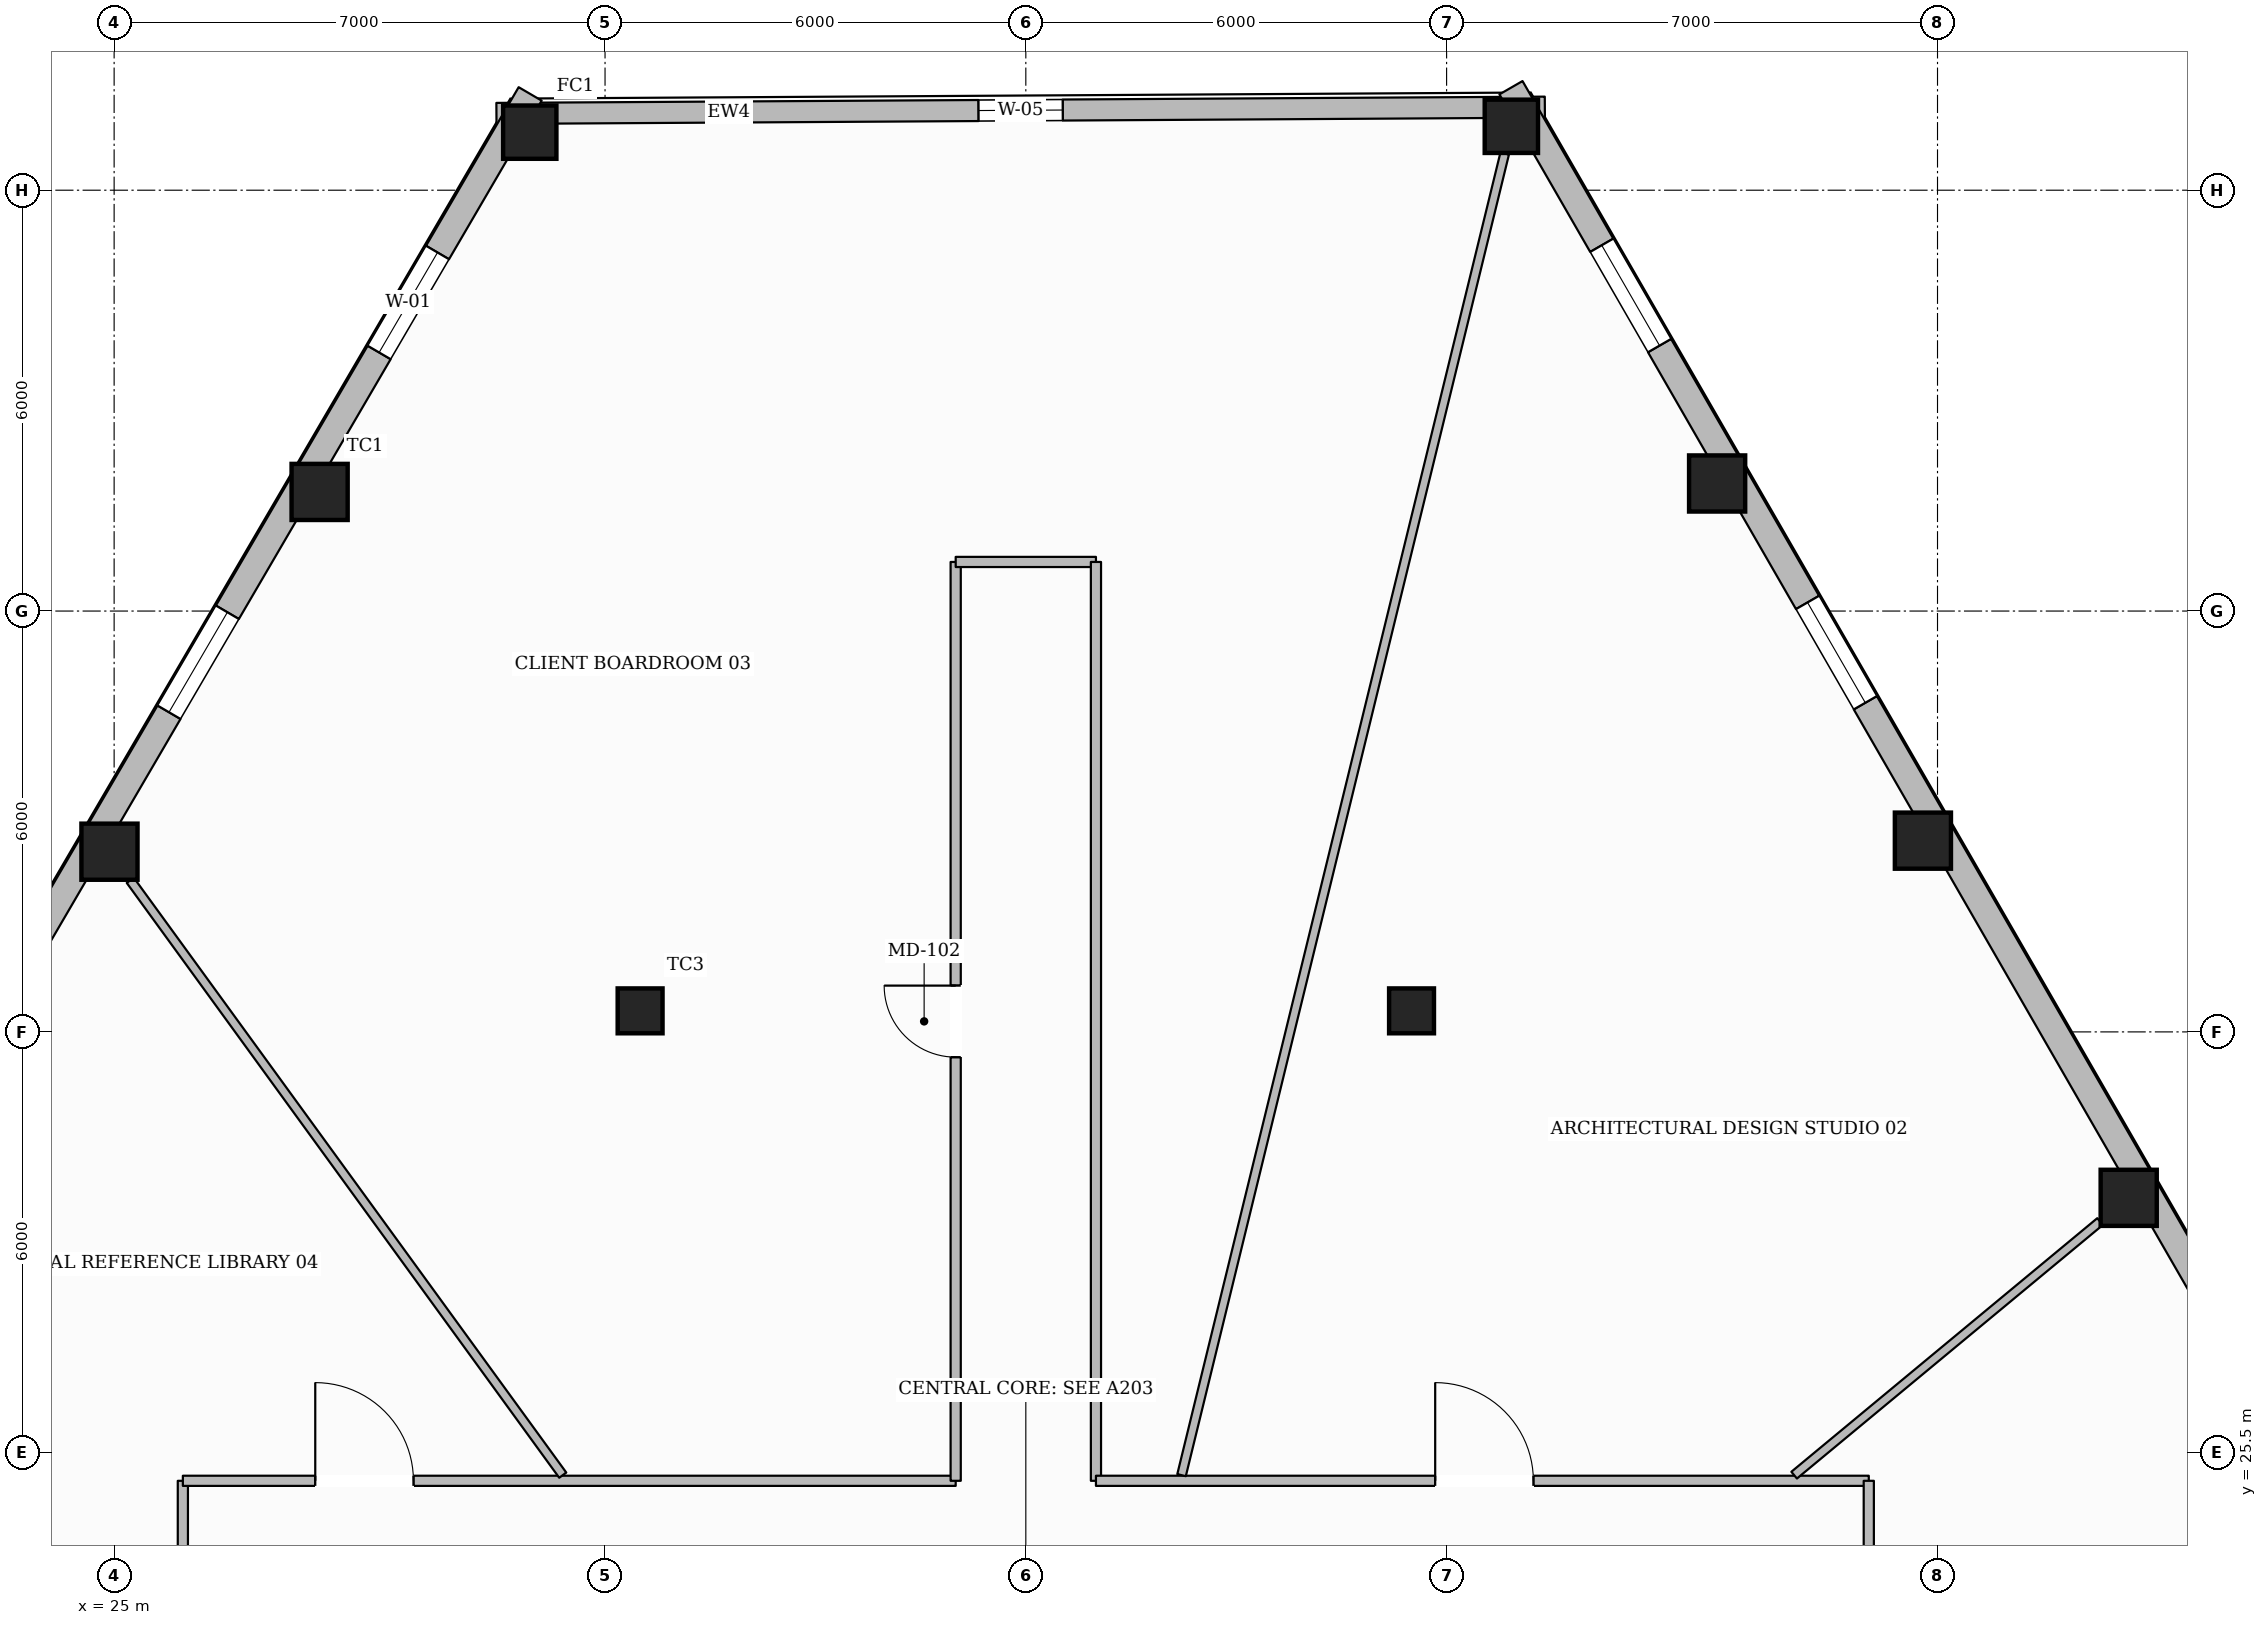
"""IFC4 building model, lengths in metres.
Left out: names, types, materials, properties, quantities, classifications, styles, units other than length and angle.
Written with IfcOpenShell. Run it as: python <this file> out.ifc"""

import sys

from ifc_helpers import new_model, si_unit, direction, frame, frame_2d, origin, origin_2d, place, context, subcontext, project, spatial, rectangle, hollow_rectangle, extrude, element, fill, save


model = new_model("IFC4")
c1 = context("Model", 3, precision=1e-05, world=origin(), true_north=direction((0.0, 1.0)))
c2 = subcontext(c1, "Body", "Model", "MODEL_VIEW")
j1 = project(units=[si_unit("LENGTHUNIT", "METRE"), si_unit("PLANEANGLEUNIT", "RADIAN")], contexts=[c1])
p1 = place(None, origin())
s1 = spatial("IfcSite", under=j1, at=p1, CompositionType="ELEMENT")
p2 = place(p1, origin())
s2 = spatial("IfcBuilding", under=s1, at=p2, CompositionType="ELEMENT")
p3 = place(p2, frame((0.0, 0.0, 71.45)))
s3 = spatial("IfcBuildingStorey", under=s2, at=p3, CompositionType="ELEMENT", Elevation=71.45)
p4 = place(p3, frame((30.927, 44.328, 0.0), z_axis=(0.0, 0.0, 1.0), x_axis=(1.0, 0.0, 0.0)))
e1 = element("IfcColumn", 1, at=p4, inside=s3, PredefinedType="COLUMN", context=c2, shape_type="SweptSolid", body=[
    extrude(hollow_rectangle(XDim=0.76, YDim=0.76, WallThickness=0.035, at=origin_2d()), origin(), (0.0, 0.0, 1.0), 3.43),
])
for number, where, z_axis, x_axis in (
    (2, (27.93, 39.198, 0.0), (0.0, 0.0, 1.0), (1.0, 0.0, 0.0)),
    (3, (24.934, 34.069, 0.0), (0.0, 0.0, 1.0), (1.0, 0.0, 0.0)),
    (4, (53.726, 29.134, 0.0), (0.0, 0.0, 1.0), (1.0, 0.0, 0.0)),
    (5, (50.792, 34.227, 0.0), (0.0, 0.0, 1.0), (1.0, 0.0, 0.0)),
    (6, (47.857, 39.319, 0.0), (0.0, 0.0, 1.0), (1.0, 0.0, 0.0)),
):
    element("IfcColumn", number, at=place(p3, frame(where, z_axis=z_axis, x_axis=x_axis)), inside=s3, PredefinedType="COLUMN", context=c2, shape_type="SweptSolid", body=[
        extrude(hollow_rectangle(XDim=0.8, YDim=0.8, WallThickness=0.036, at=origin_2d()), origin(), (0.0, 0.0, 1.0), 3.43),
    ])
p5 = place(p3, frame((44.923, 44.411, 0.0), z_axis=(0.0, 0.0, 1.0), x_axis=(1.0, 0.0, 0.0)))
e7 = element("IfcColumn", 7, at=p5, inside=s3, PredefinedType="COLUMN", context=c2, shape_type="SweptSolid", body=[
    extrude(hollow_rectangle(XDim=0.76, YDim=0.76, WallThickness=0.035, at=origin_2d()), origin(), (0.0, 0.0, 1.0), 3.43),
])
for number, where, z_axis, x_axis in (
    (8, (32.5, 31.8, 0.0), (0.0, 0.0, 1.0), (1.0, 0.0, 0.0)),
    (9, (43.5, 31.8, 0.0), (0.0, 0.0, 1.0), (1.0, 0.0, 0.0)),
):
    element("IfcColumn", number, at=place(p3, frame(where, z_axis=z_axis, x_axis=x_axis)), inside=s3, PredefinedType="COLUMN", context=c2, shape_type="SweptSolid", body=[
        extrude(hollow_rectangle(XDim=0.64, YDim=0.64, WallThickness=0.028, at=origin_2d()), origin(), (0.0, 0.0, 1.0), 3.43),
    ])
p6 = place(p3, frame((30.451, 44.595, 0.0), z_axis=(0.0, 0.0, 1.0), x_axis=(0.999982137203, 0.005977062405, 0.0)))
e10 = element("IfcWall", 10, at=p6, inside=s3, PredefinedType="STANDARD", context=c2, shape_type="SweptSolid", body=[
    extrude(rectangle(XDim=14.95, YDim=0.3, at=frame_2d((7.475, 0.0))), origin(), (0.0, 0.0, 1.0), 2.81),
])
p7 = place(p6, frame((6.875, 0.0, 0.65)))
e11 = element("IfcOpeningElement", 11, at=p7, cuts=e10, PredefinedType="OPENING", context=c2, shape_type="SweptSolid", body=[
    extrude(rectangle(XDim=1.2, YDim=1.55, at=frame_2d((0.6, 0.775))), frame((0.0, 0.16, 0.0), z_axis=(0.0, -1.0, 0.0), x_axis=(1.0, 0.0, 0.0)), (0.0, 0.0, 1.0), 0.32),
])
p8 = place(p3, frame((12.473, 13.275, 0.0), z_axis=(0.0, 0.0, 1.0), x_axis=(0.504426765764, 0.863454479391, 0.0)))
e12 = element("IfcWall", 12, at=p8, inside=s3, PredefinedType="STANDARD", context=c2, shape_type="SweptSolid", body=[
    extrude(rectangle(XDim=36.594, YDim=0.38, at=frame_2d((18.297, 0.0))), origin(), (0.0, 0.0, 1.0), 2.81),
])
p9 = place(p8, frame((8.749, 0.0, 0.0)))
e13 = element("IfcOpeningElement", 13, at=p9, cuts=e12, PredefinedType="OPENING", context=c2, shape_type="SweptSolid", body=[
    extrude(rectangle(XDim=1.0, YDim=2.2, at=frame_2d((0.5, 1.1))), frame((0.0, 0.2, 0.0), z_axis=(0.0, -1.0, 0.0), x_axis=(1.0, 0.0, 0.0)), (0.0, 0.0, 1.0), 0.4),
])
p10 = place(p8, frame((32.326, 0.0, 0.55)))
e14 = element("IfcOpeningElement", 14, at=p10, cuts=e12, PredefinedType="OPENING", context=c2, shape_type="SweptSolid", body=[
    extrude(rectangle(XDim=1.65, YDim=1.6, at=frame_2d((0.825, 0.8))), frame((0.0, 0.2, 0.0), z_axis=(0.0, -1.0, 0.0), x_axis=(1.0, 0.0, 0.0)), (0.0, 0.0, 1.0), 0.4),
])
p11 = place(p8, frame((26.385, 0.0, 0.55)))
e15 = element("IfcOpeningElement", 15, at=p11, cuts=e12, PredefinedType="OPENING", context=c2, shape_type="SweptSolid", body=[
    extrude(rectangle(XDim=1.65, YDim=1.6, at=frame_2d((0.825, 0.8))), frame((0.0, 0.2, 0.0), z_axis=(0.0, -1.0, 0.0), x_axis=(1.0, 0.0, 0.0)), (0.0, 0.0, 1.0), 0.4),
])
p12 = place(p8, frame((20.445, 0.0, 0.55)))
e16 = element("IfcOpeningElement", 16, at=p12, cuts=e12, PredefinedType="OPENING", context=c2, shape_type="SweptSolid", body=[
    extrude(rectangle(XDim=1.65, YDim=1.6, at=frame_2d((0.825, 0.8))), frame((0.0, 0.2, 0.0), z_axis=(0.0, -1.0, 0.0), x_axis=(1.0, 0.0, 0.0)), (0.0, 0.0, 1.0), 0.4),
])
p13 = place(p8, frame((2.624, 0.0, 0.55)))
e17 = element("IfcOpeningElement", 17, at=p13, cuts=e12, PredefinedType="OPENING", context=c2, shape_type="SweptSolid", body=[
    extrude(rectangle(XDim=1.65, YDim=1.6, at=frame_2d((0.825, 0.8))), frame((0.0, 0.2, 0.0), z_axis=(0.0, -1.0, 0.0), x_axis=(1.0, 0.0, 0.0)), (0.0, 0.0, 1.0), 0.4),
])
p14 = place(p3, frame((44.918, 44.961, 0.0), z_axis=(0.0, 0.0, 1.0), x_axis=(0.499266462474, -0.866448497863, 0.0)))
e18 = element("IfcWall", 18, at=p14, inside=s3, PredefinedType="STANDARD", context=c2, shape_type="SweptSolid", body=[
    extrude(rectangle(XDim=36.221, YDim=0.38, at=frame_2d((18.11, 0.0))), origin(), (0.0, 0.0, 1.0), 2.81),
])
p15 = place(p14, frame((31.979, 0.0, 0.55)))
e19 = element("IfcOpeningElement", 19, at=p15, cuts=e18, PredefinedType="OPENING", context=c2, shape_type="SweptSolid", body=[
    extrude(rectangle(XDim=1.65, YDim=1.6, at=frame_2d((0.825, 0.8))), frame((0.0, 0.2, 0.0), z_axis=(0.0, -1.0, 0.0), x_axis=(1.0, 0.0, 0.0)), (0.0, 0.0, 1.0), 0.4),
])
p16 = place(p14, frame((26.102, 0.0, 0.55)))
e20 = element("IfcOpeningElement", 20, at=p16, cuts=e18, PredefinedType="OPENING", context=c2, shape_type="SweptSolid", body=[
    extrude(rectangle(XDim=1.65, YDim=1.6, at=frame_2d((0.825, 0.8))), frame((0.0, 0.2, 0.0), z_axis=(0.0, -1.0, 0.0), x_axis=(1.0, 0.0, 0.0)), (0.0, 0.0, 1.0), 0.4),
])
p17 = place(p14, frame((20.224, 0.0, 0.55)))
e21 = element("IfcOpeningElement", 21, at=p17, cuts=e18, PredefinedType="OPENING", context=c2, shape_type="SweptSolid", body=[
    extrude(rectangle(XDim=1.65, YDim=1.6, at=frame_2d((0.825, 0.8))), frame((0.0, 0.2, 0.0), z_axis=(0.0, -1.0, 0.0), x_axis=(1.0, 0.0, 0.0)), (0.0, 0.0, 1.0), 0.4),
])
p18 = place(p14, frame((8.47, 0.0, 0.55)))
e22 = element("IfcOpeningElement", 22, at=p18, cuts=e18, PredefinedType="OPENING", context=c2, shape_type="SweptSolid", body=[
    extrude(rectangle(XDim=1.65, YDim=1.6, at=frame_2d((0.825, 0.8))), frame((0.0, 0.2, 0.0), z_axis=(0.0, -1.0, 0.0), x_axis=(1.0, 0.0, 0.0)), (0.0, 0.0, 1.0), 0.4),
])
p19 = place(p14, frame((2.593, 0.0, 0.55)))
e23 = element("IfcOpeningElement", 23, at=p19, cuts=e18, PredefinedType="OPENING", context=c2, shape_type="SweptSolid", body=[
    extrude(rectangle(XDim=1.65, YDim=1.6, at=frame_2d((0.825, 0.8))), frame((0.0, 0.2, 0.0), z_axis=(0.0, -1.0, 0.0), x_axis=(1.0, 0.0, 0.0)), (0.0, 0.0, 1.0), 0.4),
])
p20 = place(p3, frame((25.98, 9.1, 0.0), z_axis=(0.0, 0.0, 1.0), x_axis=(0.0, 1.0, 0.0)))
e24 = element("IfcWall", 24, at=p20, inside=s3, PredefinedType="PARTITIONING", context=c2, shape_type="SweptSolid", body=[
    extrude(rectangle(XDim=16.0, YDim=0.145, at=frame_2d((8.0, 0.0))), origin(), (0.0, 0.0, 1.0), 3.118),
])
p21 = place(p20, frame((8.13, 0.0, 0.0)))
e25 = element("IfcOpeningElement", 25, at=p21, cuts=e24, PredefinedType="OPENING", context=c2, shape_type="SweptSolid", body=[
    extrude(rectangle(XDim=1.4, YDim=2.2, at=frame_2d((0.7, 1.1))), frame((0.0, 0.083, 0.0), z_axis=(0.0, -1.0, 0.0), x_axis=(1.0, 0.0, 0.0)), (0.0, 0.0, 1.0), 0.165),
])
p22 = place(p3, frame((25.98, 25.1, 0.0), z_axis=(0.0, 0.0, 1.0), x_axis=(1.0, 0.0, 0.0)))
e26 = element("IfcWall", 26, at=p22, inside=s3, PredefinedType="PARTITIONING", context=c2, shape_type="SweptSolid", body=[
    extrude(rectangle(XDim=11.02, YDim=0.145, at=frame_2d((5.51, 0.0))), origin(), (0.0, 0.0, 1.0), 3.43),
])
p23 = place(p22, frame((1.888, 0.0, 0.0)))
e27 = element("IfcOpeningElement", 27, at=p23, cuts=e26, PredefinedType="OPENING", context=c2, shape_type="SweptSolid", body=[
    extrude(rectangle(XDim=1.4, YDim=2.2, at=frame_2d((0.7, 1.1))), frame((0.0, 0.083, 0.0), z_axis=(0.0, -1.0, 0.0), x_axis=(1.0, 0.0, 0.0)), (0.0, 0.0, 1.0), 0.165),
])
p24 = place(p3, frame((37.0, 25.1, 0.0), z_axis=(0.0, 0.0, 1.0), x_axis=(0.0, 1.0, 0.0)))
e28 = element("IfcWall", 28, at=p24, inside=s3, PredefinedType="PARTITIONING", context=c2, shape_type="SweptSolid", body=[
    extrude(rectangle(XDim=13.1, YDim=0.145, at=frame_2d((6.55, 0.0))), origin(), (0.0, 0.0, 1.0), 3.43),
])
p25 = place(p24, frame((6.04, 0.0, 0.0)))
e29 = element("IfcOpeningElement", 29, at=p25, cuts=e28, PredefinedType="OPENING", context=c2, shape_type="SweptSolid", body=[
    extrude(rectangle(XDim=1.02, YDim=2.15, at=frame_2d((0.51, 1.075))), frame((0.0, 0.083, 0.0), z_axis=(0.0, -1.0, 0.0), x_axis=(1.0, 0.0, 0.0)), (0.0, 0.0, 1.0), 0.165),
])
p26 = place(p3, frame((37.0, 38.2, 0.0), z_axis=(0.0, 0.0, 1.0), x_axis=(1.0, 0.0, 0.0)))
e30 = element("IfcWall", 30, at=p26, inside=s3, PredefinedType="PARTITIONING", context=c2, shape_type="SweptSolid", body=[
    extrude(rectangle(XDim=2.0, YDim=0.145, at=frame_2d((1.0, 0.0))), origin(), (0.0, 0.0, 1.0), 3.118),
])
p27 = place(p3, frame((39.0, 38.2, 0.0), z_axis=(0.0, 0.0, 1.0), x_axis=(0.0, -1.0, 0.0)))
e31 = element("IfcWall", 31, at=p27, inside=s3, PredefinedType="PARTITIONING", context=c2, shape_type="SweptSolid", body=[
    extrude(rectangle(XDim=13.1, YDim=0.145, at=frame_2d((6.55, 0.0))), origin(), (0.0, 0.0, 1.0), 3.43),
])
p28 = place(p3, frame((39.0, 25.1, 0.0), z_axis=(0.0, 0.0, 1.0), x_axis=(1.0, 0.0, 0.0)))
e32 = element("IfcWall", 32, at=p28, inside=s3, PredefinedType="PARTITIONING", context=c2, shape_type="SweptSolid", body=[
    extrude(rectangle(XDim=11.02, YDim=0.145, at=frame_2d((5.51, 0.0))), origin(), (0.0, 0.0, 1.0), 3.43),
])
p29 = place(p28, frame((4.837, 0.0, 0.0)))
e33 = element("IfcOpeningElement", 33, at=p29, cuts=e32, PredefinedType="OPENING", context=c2, shape_type="SweptSolid", body=[
    extrude(rectangle(XDim=1.4, YDim=2.2, at=frame_2d((0.7, 1.1))), frame((0.0, 0.083, 0.0), z_axis=(0.0, -1.0, 0.0), x_axis=(1.0, 0.0, 0.0)), (0.0, 0.0, 1.0), 0.165),
])
p30 = place(p3, frame((50.02, 25.1, 0.0), z_axis=(0.0, 0.0, 1.0), x_axis=(0.0, -1.0, 0.0)))
e34 = element("IfcWall", 34, at=p30, inside=s3, PredefinedType="PARTITIONING", context=c2, shape_type="SweptSolid", body=[
    extrude(rectangle(XDim=16.0, YDim=0.145, at=frame_2d((8.0, 0.0))), origin(), (0.0, 0.0, 1.0), 3.118),
])
p31 = place(p30, frame((3.087, 0.0, 0.0)))
e35 = element("IfcOpeningElement", 35, at=p31, cuts=e34, PredefinedType="OPENING", context=c2, shape_type="SweptSolid", body=[
    extrude(rectangle(XDim=1.4, YDim=2.2, at=frame_2d((0.7, 1.1))), frame((0.0, 0.083, 0.0), z_axis=(0.0, -1.0, 0.0), x_axis=(1.0, 0.0, 0.0)), (0.0, 0.0, 1.0), 0.165),
])
p32 = place(p30, frame((9.235, 0.0, 0.0)))
e36 = element("IfcOpeningElement", 36, at=p32, cuts=e34, PredefinedType="OPENING", context=c2, shape_type="SweptSolid", body=[
    extrude(rectangle(XDim=1.4, YDim=2.2, at=frame_2d((0.7, 1.1))), frame((0.0, 0.083, 0.0), z_axis=(0.0, -1.0, 0.0), x_axis=(1.0, 0.0, 0.0)), (0.0, 0.0, 1.0), 0.165),
])
p33 = place(p3, frame((48.956, 25.18, 0.0), z_axis=(0.0, 0.0, 1.0), x_axis=(0.769913890062, 0.638147790006, 0.0)))
e37 = element("IfcWall", 37, at=p33, inside=s3, PredefinedType="PARTITIONING", context=c2, shape_type="SweptSolid", body=[
    extrude(rectangle(XDim=5.666, YDim=0.125, at=frame_2d((2.833, 0.0))), origin(), (0.0, 0.0, 1.0), 2.897),
])
p34 = place(p3, frame((40.221, 25.18, 0.0), z_axis=(0.0, 0.0, 1.0), x_axis=(0.237533584256, 0.971379326705, 0.0)))
e38 = element("IfcWall", 38, at=p34, inside=s3, PredefinedType="PARTITIONING", context=c2, shape_type="SweptSolid", body=[
    extrude(rectangle(XDim=19.398, YDim=0.125, at=frame_2d((9.699, 0.0))), origin(), (0.0, 0.0, 1.0), 3.43),
])
p35 = place(p3, frame((31.397, 25.18, 0.0), z_axis=(0.0, 0.0, 1.0), x_axis=(-0.588106629078, 0.808783402917, 0.0)))
e39 = element("IfcWall", 39, at=p35, inside=s3, PredefinedType="PARTITIONING", context=c2, shape_type="SweptSolid", body=[
    extrude(rectangle(XDim=10.486, YDim=0.125, at=frame_2d((5.243, 0.0))), origin(), (0.0, 0.0, 1.0), 2.897),
])
p36 = place(p10, origin())
e40 = element("IfcWindow", 40, at=p36, inside=s3, PartitioningType="SINGLE_PANEL", PredefinedType="WINDOW", context=c2, shape_type="SweptSolid", body=[
    extrude(rectangle(XDim=1.65, YDim=1.6, at=frame_2d((0.825, 0.8))), frame((0.0, 0.03, 0.0), z_axis=(0.0, -1.0, 0.0), x_axis=(1.0, 0.0, 0.0)), (0.0, 0.0, 1.0), 0.06),
])
fill(e14, e40)
p37 = place(p11, origin())
e41 = element("IfcWindow", 41, at=p37, inside=s3, PartitioningType="SINGLE_PANEL", PredefinedType="WINDOW", context=c2, shape_type="SweptSolid", body=[
    extrude(rectangle(XDim=1.65, YDim=1.6, at=frame_2d((0.825, 0.8))), frame((0.0, 0.03, 0.0), z_axis=(0.0, -1.0, 0.0), x_axis=(1.0, 0.0, 0.0)), (0.0, 0.0, 1.0), 0.06),
])
fill(e15, e41)
p38 = place(p18, origin())
e42 = element("IfcWindow", 42, at=p38, inside=s3, PartitioningType="SINGLE_PANEL", PredefinedType="WINDOW", context=c2, shape_type="SweptSolid", body=[
    extrude(rectangle(XDim=1.65, YDim=1.6, at=frame_2d((0.825, 0.8))), frame((0.0, 0.03, 0.0), z_axis=(0.0, -1.0, 0.0), x_axis=(1.0, 0.0, 0.0)), (0.0, 0.0, 1.0), 0.06),
])
fill(e22, e42)
p39 = place(p19, origin())
e43 = element("IfcWindow", 43, at=p39, inside=s3, PartitioningType="SINGLE_PANEL", PredefinedType="WINDOW", context=c2, shape_type="SweptSolid", body=[
    extrude(rectangle(XDim=1.65, YDim=1.6, at=frame_2d((0.825, 0.8))), frame((0.0, 0.03, 0.0), z_axis=(0.0, -1.0, 0.0), x_axis=(1.0, 0.0, 0.0)), (0.0, 0.0, 1.0), 0.06),
])
fill(e23, e43)
p40 = place(p7, origin())
e44 = element("IfcWindow", 44, at=p40, inside=s3, PartitioningType="SINGLE_PANEL", PredefinedType="WINDOW", context=c2, shape_type="SweptSolid", body=[
    extrude(rectangle(XDim=1.2, YDim=1.55, at=frame_2d((0.6, 0.775))), frame((0.0, 0.03, 0.0), z_axis=(0.0, -1.0, 0.0), x_axis=(1.0, 0.0, 0.0)), (0.0, 0.0, 1.0), 0.06),
])
fill(e11, e44)
p41 = place(p29, origin())
e45 = element("IfcDoor", 45, at=p41, inside=s3, OperationType="SINGLE_SWING_LEFT", PredefinedType="DOOR", context=c2, shape_type="SweptSolid", body=[
    extrude(rectangle(XDim=1.4, YDim=2.2, at=frame_2d((0.7, 1.1))), frame((0.0, 0.025, 0.0), z_axis=(0.0, -1.0, 0.0), x_axis=(1.0, 0.0, 0.0)), (0.0, 0.0, 1.0), 0.05),
])
fill(e33, e45)
p42 = place(p25, origin())
e46 = element("IfcDoor", 46, at=p42, inside=s3, OperationType="SINGLE_SWING_RIGHT", PredefinedType="DOOR", context=c2, shape_type="SweptSolid", body=[
    extrude(rectangle(XDim=1.02, YDim=2.15, at=frame_2d((0.51, 1.075))), frame((0.0, 0.025, 0.0), z_axis=(0.0, -1.0, 0.0), x_axis=(1.0, 0.0, 0.0)), (0.0, 0.0, 1.0), 0.05),
])
fill(e29, e46)
p43 = place(p23, origin())
e47 = element("IfcDoor", 47, at=p43, inside=s3, OperationType="SINGLE_SWING_LEFT", PredefinedType="DOOR", context=c2, shape_type="SweptSolid", body=[
    extrude(rectangle(XDim=1.4, YDim=2.2, at=frame_2d((0.7, 1.1))), frame((0.0, 0.025, 0.0), z_axis=(0.0, -1.0, 0.0), x_axis=(1.0, 0.0, 0.0)), (0.0, 0.0, 1.0), 0.05),
])
fill(e27, e47)
save(model, sys.argv[1])
